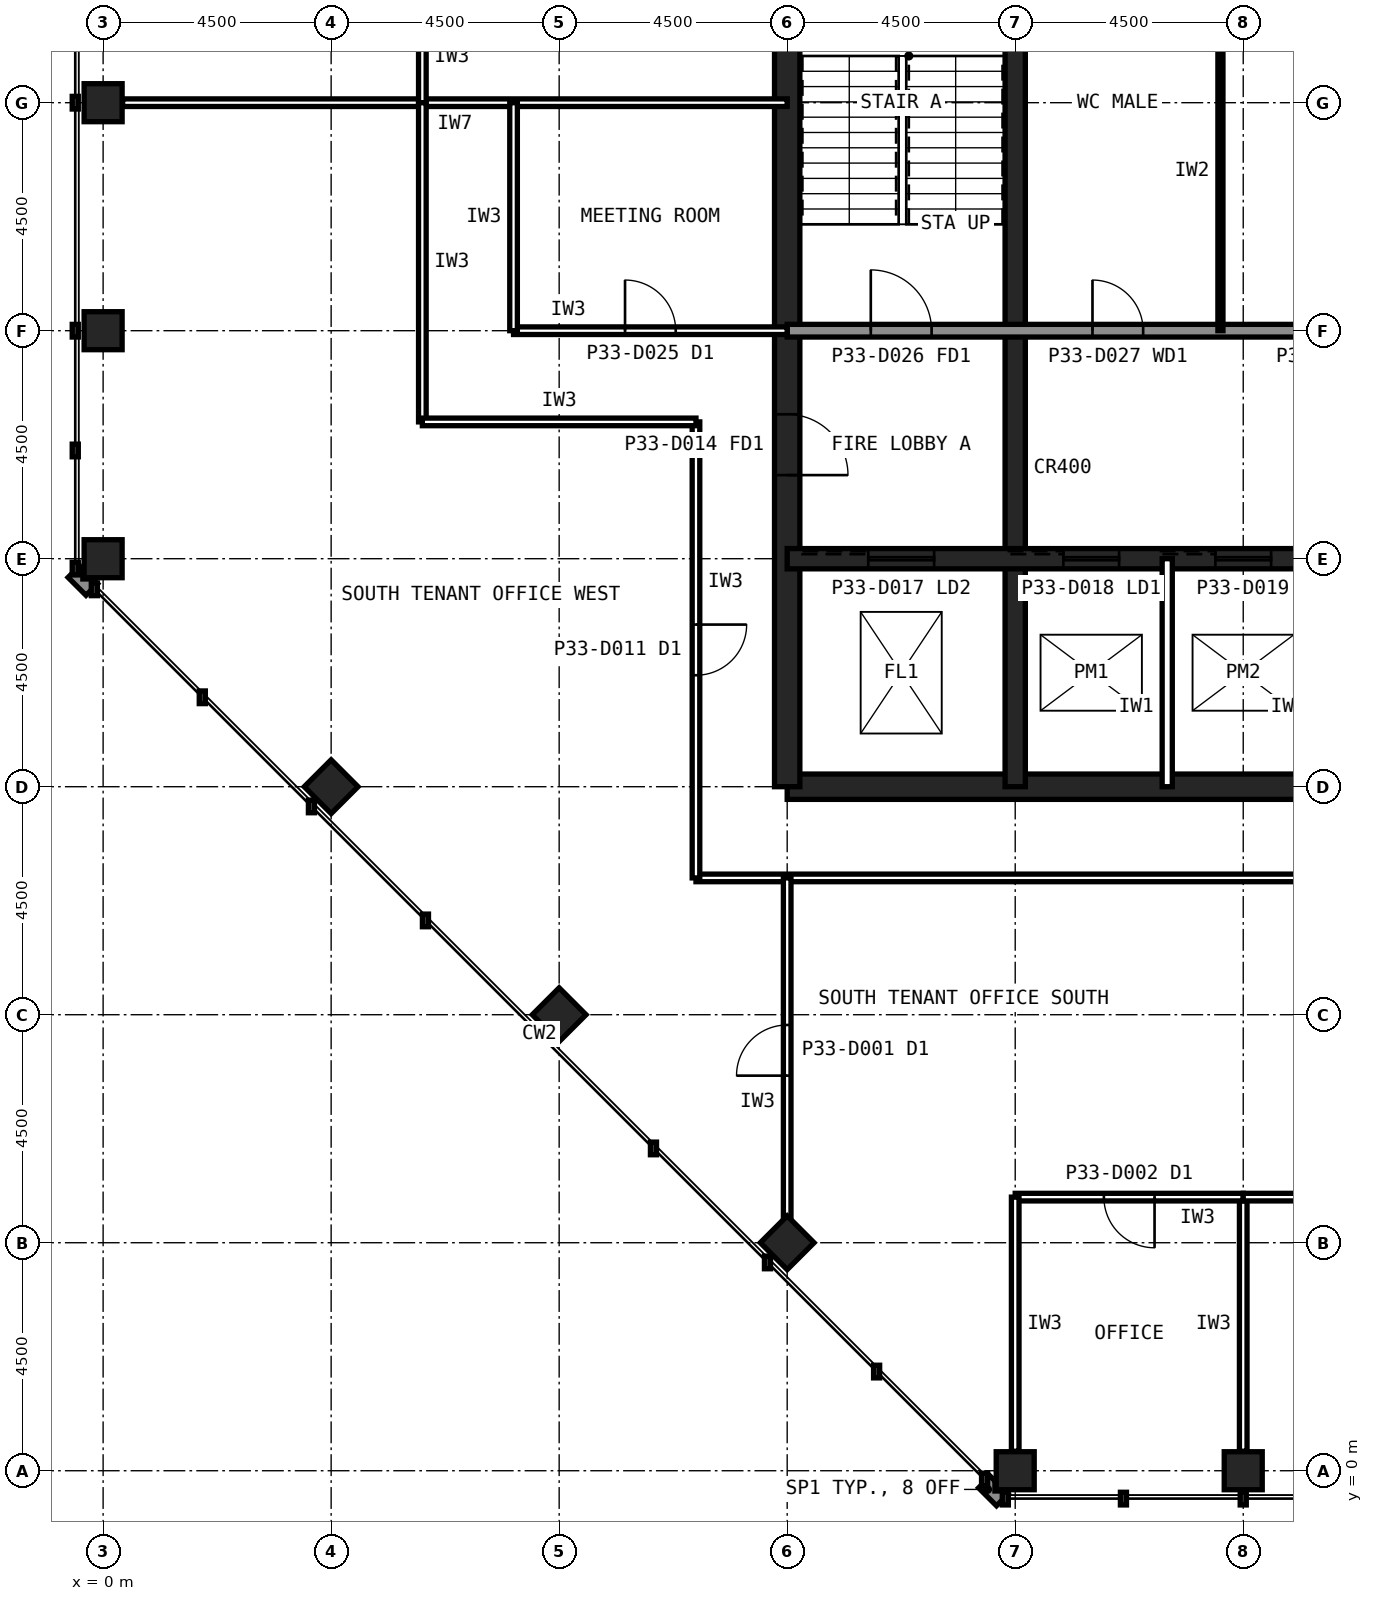
"""IFC4 building model, lengths in metres.
Left out: names, types, materials, properties, quantities, classifications, styles, units other than length and angle.
Written with IfcOpenShell. Run it as: python <this file> out.ifc"""

import sys

from ifc_helpers import new_model, si_unit, direction, frame, frame_2d, origin, origin_2d, place, context, subcontext, project, spatial, rectangle, hollow_rectangle, extrude, element, fill, save


model = new_model("IFC4")
c1 = context("Model", 3, precision=1e-05, world=origin(), true_north=direction((0.0, 1.0)))
c2 = subcontext(c1, "Body", "Model", "MODEL_VIEW")
j1 = project(units=[si_unit("LENGTHUNIT", "METRE"), si_unit("PLANEANGLEUNIT", "RADIAN")], contexts=[c1])
p1 = place(None, origin())
s1 = spatial("IfcSite", under=j1, at=p1, CompositionType="ELEMENT")
p2 = place(p1, origin())
s2 = spatial("IfcBuilding", under=s1, at=p2, CompositionType="ELEMENT")
p3 = place(p2, frame((0.0, 0.0, 143.6)))
s3 = spatial("IfcBuildingStorey", under=s2, at=p3, CompositionType="ELEMENT", Elevation=143.6)
for number, where, z_axis, x_axis in (
    (1, (18.0, 0.0, 0.0), (0.0, 0.0, 1.0), (1.0, 0.0, 0.0)),
    (2, (22.5, 0.0, 0.0), (0.0, 0.0, 1.0), (1.0, 0.0, 0.0)),
    (3, (0.0, 27.0, 0.0), (0.0, 0.0, 1.0), (1.0, 0.0, 0.0)),
    (4, (0.0, 22.5, 0.0), (0.0, 0.0, 1.0), (1.0, 0.0, 0.0)),
    (5, (0.0, 18.0, 0.0), (0.0, 0.0, 1.0), (1.0, 0.0, 0.0)),
    (6, (13.5, 4.5, 0.0), (0.0, 0.0, 1.0), (0.707, 0.707, 0.0)),
    (7, (9.0, 9.0, 0.0), (0.0, 0.0, 1.0), (0.707, 0.707, 0.0)),
    (8, (4.5, 13.5, 0.0), (0.0, 0.0, 1.0), (0.707, 0.707, 0.0)),
):
    element("IfcColumn", number, at=place(p3, frame(where, z_axis=z_axis, x_axis=x_axis)), inside=s3, PredefinedType="COLUMN", context=c2, shape_type="SweptSolid", body=[
        extrude(hollow_rectangle(XDim=0.75, YDim=0.75, WallThickness=0.04, at=origin_2d()), origin(), (0.0, 0.0, 1.0), 4.0),
    ])
p4 = place(p3, frame((13.5, 13.5, 0.0), z_axis=(0.0, 0.0, 1.0), x_axis=(1.0, 0.0, 0.0)))
e9 = element("IfcWall", 9, at=p4, inside=s3, PredefinedType="SHEAR", context=c2, shape_type="SweptSolid", body=[
    extrude(rectangle(XDim=27.0, YDim=0.5, at=frame_2d((13.5, 0.0))), origin(), (0.0, 0.0, 1.0), 4.0),
])
p5 = place(p3, frame((13.5, 40.5, 0.0), z_axis=(0.0, 0.0, 1.0), x_axis=(0.0, -1.0, 0.0)))
e10 = element("IfcWall", 10, at=p5, inside=s3, PredefinedType="SHEAR", context=c2, shape_type="SweptSolid", body=[
    extrude(rectangle(XDim=27.0, YDim=0.5, at=frame_2d((13.5, 0.0))), origin(), (0.0, 0.0, 1.0), 4.0),
])
p6 = place(p5, frame((19.65, 0.0, 0.0)))
e11 = element("IfcOpeningElement", 11, at=p6, cuts=e10, PredefinedType="OPENING", context=c2, shape_type="SweptSolid", body=[
    extrude(rectangle(XDim=1.2, YDim=2.1, at=frame_2d((0.6, 1.05))), frame((0.0, 0.26, 0.0), z_axis=(0.0, -1.0, 0.0), x_axis=(1.0, 0.0, 0.0)), (0.0, 0.0, 1.0), 0.52),
])
p7 = place(p5, frame((5.85, 0.0, 0.0)))
e12 = element("IfcOpeningElement", 12, at=p7, cuts=e10, PredefinedType="OPENING", context=c2, shape_type="SweptSolid", body=[
    extrude(rectangle(XDim=1.8, YDim=2.1, at=frame_2d((0.9, 1.05))), frame((0.0, 0.26, 0.0), z_axis=(0.0, -1.0, 0.0), x_axis=(1.0, 0.0, 0.0)), (0.0, 0.0, 1.0), 0.52),
])
p8 = place(p3, frame((18.0, 13.5, 0.0), z_axis=(0.0, 0.0, 1.0), x_axis=(0.0, 1.0, 0.0)))
e13 = element("IfcWall", 13, at=p8, inside=s3, PredefinedType="SHEAR", context=c2, shape_type="SweptSolid", body=[
    extrude(rectangle(XDim=18.0, YDim=0.4, at=frame_2d((9.0, 0.0))), origin(), (0.0, 0.0, 1.0), 4.0),
])
p9 = place(p3, frame((13.5, 18.0, 0.0), z_axis=(0.0, 0.0, 1.0), x_axis=(1.0, 0.0, 0.0)))
e14 = element("IfcWall", 14, at=p9, inside=s3, PredefinedType="SHEAR", context=c2, shape_type="SweptSolid", body=[
    extrude(rectangle(XDim=27.0, YDim=0.4, at=frame_2d((13.5, 0.0))), origin(), (0.0, 0.0, 1.0), 4.0),
])
p10 = place(p9, frame((24.3, 0.0, 0.0)))
e15 = element("IfcOpeningElement", 15, at=p10, cuts=e14, PredefinedType="OPENING", context=c2, shape_type="SweptSolid", body=[
    extrude(rectangle(XDim=0.9, YDim=2.1, at=frame_2d((0.45, 1.05))), frame((0.0, 0.21, 0.0), z_axis=(0.0, -1.0, 0.0), x_axis=(1.0, 0.0, 0.0)), (0.0, 0.0, 1.0), 0.42),
])
p11 = place(p9, frame((5.45, 0.0, 0.0)))
e16 = element("IfcOpeningElement", 16, at=p11, cuts=e14, PredefinedType="OPENING", context=c2, shape_type="SweptSolid", body=[
    extrude(rectangle(XDim=1.1, YDim=2.1, at=frame_2d((0.55, 1.05))), frame((0.0, 0.21, 0.0), z_axis=(0.0, -1.0, 0.0), x_axis=(1.0, 0.0, 0.0)), (0.0, 0.0, 1.0), 0.42),
])
p12 = place(p9, frame((8.45, 0.0, 0.0)))
e17 = element("IfcOpeningElement", 17, at=p12, cuts=e14, PredefinedType="OPENING", context=c2, shape_type="SweptSolid", body=[
    extrude(rectangle(XDim=1.1, YDim=2.1, at=frame_2d((0.55, 1.05))), frame((0.0, 0.21, 0.0), z_axis=(0.0, -1.0, 0.0), x_axis=(1.0, 0.0, 0.0)), (0.0, 0.0, 1.0), 0.42),
])
p13 = place(p9, frame((11.45, 0.0, 0.0)))
e18 = element("IfcOpeningElement", 18, at=p13, cuts=e14, PredefinedType="OPENING", context=c2, shape_type="SweptSolid", body=[
    extrude(rectangle(XDim=1.1, YDim=2.1, at=frame_2d((0.55, 1.05))), frame((0.0, 0.21, 0.0), z_axis=(0.0, -1.0, 0.0), x_axis=(1.0, 0.0, 0.0)), (0.0, 0.0, 1.0), 0.42),
])
p14 = place(p9, frame((14.45, 0.0, 0.0)))
e19 = element("IfcOpeningElement", 19, at=p14, cuts=e14, PredefinedType="OPENING", context=c2, shape_type="SweptSolid", body=[
    extrude(rectangle(XDim=1.1, YDim=2.1, at=frame_2d((0.55, 1.05))), frame((0.0, 0.21, 0.0), z_axis=(0.0, -1.0, 0.0), x_axis=(1.0, 0.0, 0.0)), (0.0, 0.0, 1.0), 0.42),
])
p15 = place(p9, frame((17.45, 0.0, 0.0)))
e20 = element("IfcOpeningElement", 20, at=p15, cuts=e14, PredefinedType="OPENING", context=c2, shape_type="SweptSolid", body=[
    extrude(rectangle(XDim=1.1, YDim=2.1, at=frame_2d((0.55, 1.05))), frame((0.0, 0.21, 0.0), z_axis=(0.0, -1.0, 0.0), x_axis=(1.0, 0.0, 0.0)), (0.0, 0.0, 1.0), 0.42),
])
p16 = place(p9, frame((20.45, 0.0, 0.0)))
e21 = element("IfcOpeningElement", 21, at=p16, cuts=e14, PredefinedType="OPENING", context=c2, shape_type="SweptSolid", body=[
    extrude(rectangle(XDim=1.1, YDim=2.1, at=frame_2d((0.55, 1.05))), frame((0.0, 0.21, 0.0), z_axis=(0.0, -1.0, 0.0), x_axis=(1.0, 0.0, 0.0)), (0.0, 0.0, 1.0), 0.42),
])
p17 = place(p9, frame((1.6, 0.0, 0.0)))
e22 = element("IfcOpeningElement", 22, at=p17, cuts=e14, PredefinedType="OPENING", context=c2, shape_type="SweptSolid", body=[
    extrude(rectangle(XDim=1.3, YDim=2.2, at=frame_2d((0.65, 1.1))), frame((0.0, 0.21, 0.0), z_axis=(0.0, -1.0, 0.0), x_axis=(1.0, 0.0, 0.0)), (0.0, 0.0, 1.0), 0.42),
])
p18 = place(p3, frame((13.5, 22.5, 0.0), z_axis=(0.0, 0.0, 1.0), x_axis=(1.0, 0.0, 0.0)))
e23 = element("IfcWall", 23, at=p18, inside=s3, PredefinedType="SOLIDWALL", context=c2, shape_type="SweptSolid", body=[
    extrude(rectangle(XDim=27.0, YDim=0.25, at=frame_2d((13.5, 0.0))), origin(), (0.0, 0.0, 1.0), 3.84),
])
p19 = place(p18, frame((1.65, 0.0, 0.0)))
e24 = element("IfcOpeningElement", 24, at=p19, cuts=e23, PredefinedType="OPENING", context=c2, shape_type="SweptSolid", body=[
    extrude(rectangle(XDim=1.2, YDim=2.1, at=frame_2d((0.6, 1.05))), frame((0.0, 0.135, 0.0), z_axis=(0.0, -1.0, 0.0), x_axis=(1.0, 0.0, 0.0)), (0.0, 0.0, 1.0), 0.27),
])
p20 = place(p18, frame((6.025, 0.0, 0.0)))
e25 = element("IfcOpeningElement", 25, at=p20, cuts=e23, PredefinedType="OPENING", context=c2, shape_type="SweptSolid", body=[
    extrude(rectangle(XDim=1.0, YDim=2.1, at=frame_2d((0.5, 1.05))), frame((0.0, 0.135, 0.0), z_axis=(0.0, -1.0, 0.0), x_axis=(1.0, 0.0, 0.0)), (0.0, 0.0, 1.0), 0.27),
])
p21 = place(p18, frame((10.525, 0.0, 0.0)))
e26 = element("IfcOpeningElement", 26, at=p21, cuts=e23, PredefinedType="OPENING", context=c2, shape_type="SweptSolid", body=[
    extrude(rectangle(XDim=1.0, YDim=2.1, at=frame_2d((0.5, 1.05))), frame((0.0, 0.135, 0.0), z_axis=(0.0, -1.0, 0.0), x_axis=(1.0, 0.0, 0.0)), (0.0, 0.0, 1.0), 0.27),
])
p22 = place(p18, frame((19.75, 0.0, 0.0)))
e27 = element("IfcOpeningElement", 27, at=p22, cuts=e23, PredefinedType="OPENING", context=c2, shape_type="SweptSolid", body=[
    extrude(rectangle(XDim=1.0, YDim=2.1, at=frame_2d((0.5, 1.05))), frame((0.0, 0.135, 0.0), z_axis=(0.0, -1.0, 0.0), x_axis=(1.0, 0.0, 0.0)), (0.0, 0.0, 1.0), 0.27),
])
p23 = place(p18, frame((15.05, 0.0, 0.0)))
e28 = element("IfcOpeningElement", 28, at=p23, cuts=e23, PredefinedType="OPENING", context=c2, shape_type="SweptSolid", body=[
    extrude(rectangle(XDim=1.4, YDim=2.4, at=frame_2d((0.7, 1.2))), frame((0.0, 0.135, 0.0), z_axis=(0.0, -1.0, 0.0), x_axis=(1.0, 0.0, 0.0)), (0.0, 0.0, 1.0), 0.27),
])
p24 = place(p3, frame((21.0, 13.5, 0.0), z_axis=(0.0, 0.0, 1.0), x_axis=(0.0, 1.0, 0.0)))
e29 = element("IfcWall", 29, at=p24, inside=s3, PredefinedType="PARTITIONING", context=c2, shape_type="SweptSolid", body=[
    extrude(rectangle(XDim=4.5, YDim=0.2, at=frame_2d((2.25, 0.0))), origin(), (0.0, 0.0, 1.0), 3.84),
])
p25 = place(p3, frame((22.05, 22.5, 0.0), z_axis=(0.0, 0.0, 1.0), x_axis=(0.0, 1.0, 0.0)))
e30 = element("IfcWall", 30, at=p25, inside=s3, PredefinedType="PLUMBINGWALL", context=c2, shape_type="SweptSolid", body=[
    extrude(rectangle(XDim=9.0, YDim=0.1, at=frame_2d((4.5, 0.0))), origin(), (0.0, 0.0, 1.0), 3.84),
])
p26 = place(p3, frame((0.385, 27.0, 0.0), z_axis=(0.0, 0.0, 1.0), x_axis=(1.0, 0.0, 0.0)))
e31 = element("IfcWall", 31, at=p26, inside=s3, PredefinedType="PARTITIONING", context=c2, shape_type="SweptSolid", body=[
    extrude(rectangle(XDim=13.115, YDim=0.15, at=frame_2d((6.558, 0.0))), origin(), (0.0, 0.0, 1.0), 2.989),
])
p27 = place(p3, frame((6.3, 28.8, 0.0), z_axis=(0.0, 0.0, 1.0), x_axis=(0.0, -1.0, 0.0)))
e32 = element("IfcWall", 32, at=p27, inside=s3, PredefinedType="PARTITIONING", context=c2, shape_type="SweptSolid", body=[
    extrude(rectangle(XDim=1.8, YDim=0.15, at=frame_2d((0.9, 0.0))), origin(), (0.0, 0.0, 1.0), 3.84),
])
p28 = place(p3, frame((11.7, 11.7, 0.0), z_axis=(0.0, 0.0, 1.0), x_axis=(1.0, 0.0, 0.0)))
e33 = element("IfcWall", 33, at=p28, inside=s3, PredefinedType="PARTITIONING", context=c2, shape_type="SweptSolid", body=[
    extrude(rectangle(XDim=30.6, YDim=0.15, at=frame_2d((15.3, 0.0))), origin(), (0.0, 0.0, 1.0), 3.84),
])
p29 = place(p28, frame((13.75, 0.0, 0.0)))
e34 = element("IfcOpeningElement", 34, at=p29, cuts=e33, PredefinedType="OPENING", context=c2, shape_type="SweptSolid", body=[
    extrude(rectangle(XDim=1.0, YDim=2.1, at=frame_2d((0.5, 1.05))), frame((0.0, 0.085, 0.0), z_axis=(0.0, -1.0, 0.0), x_axis=(1.0, 0.0, 0.0)), (0.0, 0.0, 1.0), 0.17),
])
p30 = place(p3, frame((11.7, 20.7, 0.0), z_axis=(0.0, 0.0, 1.0), x_axis=(0.0, -1.0, 0.0)))
e35 = element("IfcWall", 35, at=p30, inside=s3, PredefinedType="PARTITIONING", context=c2, shape_type="SweptSolid", body=[
    extrude(rectangle(XDim=9.0, YDim=0.15, at=frame_2d((4.5, 0.0))), origin(), (0.0, 0.0, 1.0), 3.84),
])
p31 = place(p30, frame((4.0, 0.0, 0.0)))
e36 = element("IfcOpeningElement", 36, at=p31, cuts=e35, PredefinedType="OPENING", context=c2, shape_type="SweptSolid", body=[
    extrude(rectangle(XDim=1.0, YDim=2.1, at=frame_2d((0.5, 1.05))), frame((0.0, 0.085, 0.0), z_axis=(0.0, -1.0, 0.0), x_axis=(1.0, 0.0, 0.0)), (0.0, 0.0, 1.0), 0.17),
])
p32 = place(p3, frame((6.3, 27.0, 0.0), z_axis=(0.0, 0.0, 1.0), x_axis=(0.0, -1.0, 0.0)))
e37 = element("IfcWall", 37, at=p32, inside=s3, PredefinedType="PARTITIONING", context=c2, shape_type="SweptSolid", body=[
    extrude(rectangle(XDim=6.3, YDim=0.15, at=frame_2d((3.15, 0.0))), origin(), (0.0, 0.0, 1.0), 3.84),
])
p33 = place(p3, frame((6.3, 20.7, 0.0), z_axis=(0.0, 0.0, 1.0), x_axis=(1.0, 0.0, 0.0)))
e38 = element("IfcWall", 38, at=p33, inside=s3, PredefinedType="PARTITIONING", context=c2, shape_type="SweptSolid", body=[
    extrude(rectangle(XDim=5.4, YDim=0.15, at=frame_2d((2.7, 0.0))), origin(), (0.0, 0.0, 1.0), 3.84),
])
p34 = place(p3, frame((22.5, 0.385, 0.0), z_axis=(0.0, 0.0, 1.0), x_axis=(0.0, 1.0, 0.0)))
e39 = element("IfcWall", 39, at=p34, inside=s3, PredefinedType="PARTITIONING", context=c2, shape_type="SweptSolid", body=[
    extrude(rectangle(XDim=5.015, YDim=0.15, at=frame_2d((2.507, 0.0))), origin(), (0.0, 0.0, 1.0), 2.989),
])
p35 = place(p3, frame((22.5, 5.4, 0.0), z_axis=(0.0, 0.0, 1.0), x_axis=(-1.0, 0.0, 0.0)))
e40 = element("IfcWall", 40, at=p35, inside=s3, PredefinedType="PARTITIONING", context=c2, shape_type="SweptSolid", body=[
    extrude(rectangle(XDim=4.5, YDim=0.15, at=frame_2d((2.25, 0.0))), origin(), (0.0, 0.0, 1.0), 3.84),
])
p36 = place(p35, frame((1.75, 0.0, 0.0)))
e41 = element("IfcOpeningElement", 41, at=p36, cuts=e40, PredefinedType="OPENING", context=c2, shape_type="SweptSolid", body=[
    extrude(rectangle(XDim=1.0, YDim=2.1, at=frame_2d((0.5, 1.05))), frame((0.0, 0.085, 0.0), z_axis=(0.0, -1.0, 0.0), x_axis=(1.0, 0.0, 0.0)), (0.0, 0.0, 1.0), 0.17),
])
p37 = place(p3, frame((18.0, 5.4, 0.0), z_axis=(0.0, 0.0, 1.0), x_axis=(0.0, -1.0, 0.0)))
e42 = element("IfcWall", 42, at=p37, inside=s3, PredefinedType="PARTITIONING", context=c2, shape_type="SweptSolid", body=[
    extrude(rectangle(XDim=5.015, YDim=0.15, at=frame_2d((2.507, 0.0))), origin(), (0.0, 0.0, 1.0), 2.989),
])
p38 = place(p3, frame((27.0, 5.4, 0.0), z_axis=(0.0, 0.0, 1.0), x_axis=(-1.0, 0.0, 0.0)))
e43 = element("IfcWall", 43, at=p38, inside=s3, PredefinedType="PARTITIONING", context=c2, shape_type="SweptSolid", body=[
    extrude(rectangle(XDim=4.5, YDim=0.15, at=frame_2d((2.25, 0.0))), origin(), (0.0, 0.0, 1.0), 3.84),
])
p39 = place(p38, frame((1.75, 0.0, 0.0)))
e44 = element("IfcOpeningElement", 44, at=p39, cuts=e43, PredefinedType="OPENING", context=c2, shape_type="SweptSolid", body=[
    extrude(rectangle(XDim=1.0, YDim=2.1, at=frame_2d((0.5, 1.05))), frame((0.0, 0.085, 0.0), z_axis=(0.0, -1.0, 0.0), x_axis=(1.0, 0.0, 0.0)), (0.0, 0.0, 1.0), 0.17),
])
p40 = place(p3, frame((8.1, 22.5, 0.0), z_axis=(0.0, 0.0, 1.0), x_axis=(1.0, 0.0, 0.0)))
e45 = element("IfcWall", 45, at=p40, inside=s3, PredefinedType="PARTITIONING", context=c2, shape_type="SweptSolid", body=[
    extrude(rectangle(XDim=5.4, YDim=0.15, at=frame_2d((2.7, 0.0))), origin(), (0.0, 0.0, 1.0), 2.989),
])
p41 = place(p40, frame((2.2, 0.0, 0.0)))
e46 = element("IfcOpeningElement", 46, at=p41, cuts=e45, PredefinedType="OPENING", context=c2, shape_type="SweptSolid", body=[
    extrude(rectangle(XDim=1.0, YDim=2.1, at=frame_2d((0.5, 1.05))), frame((0.0, 0.085, 0.0), z_axis=(0.0, -1.0, 0.0), x_axis=(1.0, 0.0, 0.0)), (0.0, 0.0, 1.0), 0.17),
])
p42 = place(p3, frame((8.1, 27.0, 0.0), z_axis=(0.0, 0.0, 1.0), x_axis=(0.0, -1.0, 0.0)))
e47 = element("IfcWall", 47, at=p42, inside=s3, PredefinedType="PARTITIONING", context=c2, shape_type="SweptSolid", body=[
    extrude(rectangle(XDim=4.5, YDim=0.15, at=frame_2d((2.25, 0.0))), origin(), (0.0, 0.0, 1.0), 3.84),
])
p43 = place(p3, frame((13.5, 4.895, 0.0), z_axis=(0.0, 0.0, 1.0), x_axis=(0.0, 1.0, 0.0)))
e48 = element("IfcWall", 48, at=p43, inside=s3, PredefinedType="PARTITIONING", context=c2, shape_type="SweptSolid", body=[
    extrude(rectangle(XDim=6.805, YDim=0.15, at=frame_2d((3.402, 0.0))), origin(), (0.0, 0.0, 1.0), 2.989),
])
p44 = place(p43, frame((2.903, 0.0, 0.0)))
e49 = element("IfcOpeningElement", 49, at=p44, cuts=e48, PredefinedType="OPENING", context=c2, shape_type="SweptSolid", body=[
    extrude(rectangle(XDim=1.0, YDim=2.1, at=frame_2d((0.5, 1.05))), frame((0.0, 0.085, 0.0), z_axis=(0.0, -1.0, 0.0), x_axis=(1.0, 0.0, 0.0)), (0.0, 0.0, 1.0), 0.17),
])
p45 = place(p6, origin())
e50 = element("IfcDoor", 50, at=p45, inside=s3, OperationType="SINGLE_SWING_RIGHT", PredefinedType="DOOR", context=c2, shape_type="SweptSolid", body=[
    extrude(rectangle(XDim=1.2, YDim=2.1, at=frame_2d((0.6, 1.05))), frame((0.0, 0.025, 0.0), z_axis=(0.0, -1.0, 0.0), x_axis=(1.0, 0.0, 0.0)), (0.0, 0.0, 1.0), 0.05),
])
fill(e11, e50)
p46 = place(p19, origin())
e51 = element("IfcDoor", 51, at=p46, inside=s3, OperationType="SINGLE_SWING_LEFT", PredefinedType="DOOR", context=c2, shape_type="SweptSolid", body=[
    extrude(rectangle(XDim=1.2, YDim=2.1, at=frame_2d((0.6, 1.05))), frame((0.0, 0.025, 0.0), z_axis=(0.0, -1.0, 0.0), x_axis=(1.0, 0.0, 0.0)), (0.0, 0.0, 1.0), 0.05),
])
fill(e24, e51)
p47 = place(p20, origin())
e52 = element("IfcDoor", 52, at=p47, inside=s3, OperationType="SINGLE_SWING_LEFT", PredefinedType="DOOR", context=c2, shape_type="SweptSolid", body=[
    extrude(rectangle(XDim=1.0, YDim=2.1, at=frame_2d((0.5, 1.05))), frame((0.0, 0.025, 0.0), z_axis=(0.0, -1.0, 0.0), x_axis=(1.0, 0.0, 0.0)), (0.0, 0.0, 1.0), 0.05),
])
fill(e25, e52)
p48 = place(p11, origin())
e53 = element("IfcDoor", 53, at=p48, inside=s3, OperationType="SLIDING_TO_LEFT", PredefinedType="DOOR", context=c2, shape_type="SweptSolid", body=[
    extrude(rectangle(XDim=1.1, YDim=2.1, at=frame_2d((0.55, 1.05))), frame((0.0, 0.025, 0.0), z_axis=(0.0, -1.0, 0.0), x_axis=(1.0, 0.0, 0.0)), (0.0, 0.0, 1.0), 0.05),
])
fill(e16, e53)
p49 = place(p12, origin())
e54 = element("IfcDoor", 54, at=p49, inside=s3, OperationType="SLIDING_TO_LEFT", PredefinedType="DOOR", context=c2, shape_type="SweptSolid", body=[
    extrude(rectangle(XDim=1.1, YDim=2.1, at=frame_2d((0.55, 1.05))), frame((0.0, 0.025, 0.0), z_axis=(0.0, -1.0, 0.0), x_axis=(1.0, 0.0, 0.0)), (0.0, 0.0, 1.0), 0.05),
])
fill(e17, e54)
p50 = place(p17, origin())
e55 = element("IfcDoor", 55, at=p50, inside=s3, OperationType="SLIDING_TO_LEFT", PredefinedType="DOOR", context=c2, shape_type="SweptSolid", body=[
    extrude(rectangle(XDim=1.3, YDim=2.2, at=frame_2d((0.65, 1.1))), frame((0.0, 0.025, 0.0), z_axis=(0.0, -1.0, 0.0), x_axis=(1.0, 0.0, 0.0)), (0.0, 0.0, 1.0), 0.05),
])
fill(e22, e55)
p51 = place(p31, origin())
e56 = element("IfcDoor", 56, at=p51, inside=s3, OperationType="SINGLE_SWING_LEFT", PredefinedType="DOOR", context=c2, shape_type="SweptSolid", body=[
    extrude(rectangle(XDim=1.0, YDim=2.1, at=frame_2d((0.5, 1.05))), frame((0.0, 0.025, 0.0), z_axis=(0.0, -1.0, 0.0), x_axis=(1.0, 0.0, 0.0)), (0.0, 0.0, 1.0), 0.05),
])
fill(e36, e56)
p52 = place(p36, origin())
e57 = element("IfcDoor", 57, at=p52, inside=s3, OperationType="SINGLE_SWING_LEFT", PredefinedType="DOOR", context=c2, shape_type="SweptSolid", body=[
    extrude(rectangle(XDim=1.0, YDim=2.1, at=frame_2d((0.5, 1.05))), frame((0.0, 0.025, 0.0), z_axis=(0.0, -1.0, 0.0), x_axis=(1.0, 0.0, 0.0)), (0.0, 0.0, 1.0), 0.05),
])
fill(e41, e57)
p53 = place(p41, origin())
e58 = element("IfcDoor", 58, at=p53, inside=s3, OperationType="SINGLE_SWING_LEFT", PredefinedType="DOOR", context=c2, shape_type="SweptSolid", body=[
    extrude(rectangle(XDim=1.0, YDim=2.1, at=frame_2d((0.5, 1.05))), frame((0.0, 0.025, 0.0), z_axis=(0.0, -1.0, 0.0), x_axis=(1.0, 0.0, 0.0)), (0.0, 0.0, 1.0), 0.05),
])
fill(e46, e58)
p54 = place(p44, origin())
e59 = element("IfcDoor", 59, at=p54, inside=s3, OperationType="SINGLE_SWING_LEFT", PredefinedType="DOOR", context=c2, shape_type="SweptSolid", body=[
    extrude(rectangle(XDim=1.0, YDim=2.1, at=frame_2d((0.5, 1.05))), frame((0.0, 0.025, 0.0), z_axis=(0.0, -1.0, 0.0), x_axis=(1.0, 0.0, 0.0)), (0.0, 0.0, 1.0), 0.05),
])
fill(e49, e59)
save(model, sys.argv[1])
